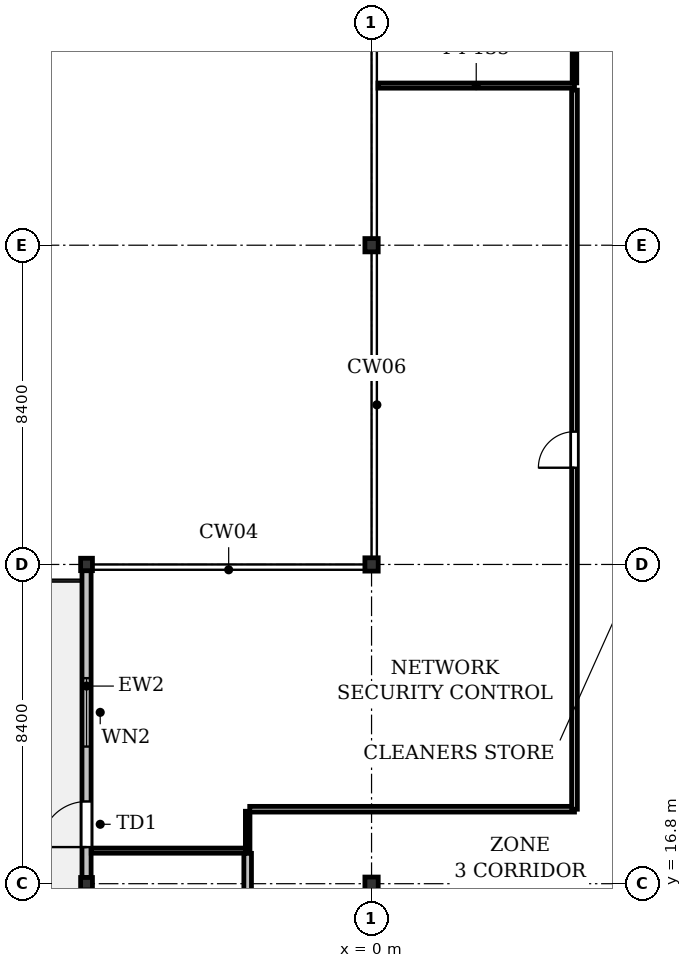
"""IFC4 building model, lengths in metres.
Left out: names, types, materials, properties, quantities, classifications, styles, units other than length and angle.
Written with IfcOpenShell. Run it as: python <this file> out.ifc"""

import sys

from ifc_helpers import new_model, si_unit, direction, frame, frame_2d, origin, origin_2d, place, context, subcontext, project, spatial, rectangle, i_section, extrude, element, fill, save


model = new_model("IFC4")
c1 = context("Model", 3, precision=1e-05, world=origin(), true_north=direction((0.0, 1.0)))
c2 = subcontext(c1, "Body", "Model", "MODEL_VIEW")
j1 = project(units=[si_unit("LENGTHUNIT", "METRE"), si_unit("PLANEANGLEUNIT", "RADIAN")], contexts=[c1])
p1 = place(None, origin())
s1 = spatial("IfcSite", under=j1, at=p1, CompositionType="ELEMENT")
p2 = place(p1, origin())
s2 = spatial("IfcBuilding", under=s1, at=p2, CompositionType="ELEMENT")
p3 = place(p2, frame((0.0, 0.0, 196.0)))
s3 = spatial("IfcBuildingStorey", under=s2, at=p3, CompositionType="ELEMENT", Elevation=196.0)
for number, where, z_axis, x_axis in (
    (1, (0.0, 16.8, 0.0), (0.0, 0.0, 1.0), (1.0, 0.0, 0.0)),
    (2, (0.0, 25.2, 0.0), (0.0, 0.0, 1.0), (1.0, 0.0, 0.0)),
    (3, (0.0, 33.6, 0.0), (0.0, 0.0, 1.0), (1.0, 0.0, 0.0)),
):
    element("IfcColumn", number, at=place(p3, frame(where, z_axis=z_axis, x_axis=x_axis)), inside=s3, PredefinedType="COLUMN", context=c2, shape_type="SweptSolid", body=[
        extrude(i_section(OverallWidth=0.35, OverallDepth=0.35, WebThickness=0.02, FlangeThickness=0.032, at=origin_2d()), origin(), (0.0, 0.0, 1.0), 4.1),
    ])
for number, where, z_axis, x_axis in (
    (4, (-7.5, 16.8, 0.0), (0.0, 0.0, 1.0), (1.0, 0.0, 0.0)),
    (5, (-7.5, 25.2, 0.0), (0.0, 0.0, 1.0), (1.0, 0.0, 0.0)),
):
    element("IfcColumn", number, at=place(p3, frame(where, z_axis=z_axis, x_axis=x_axis)), inside=s3, PredefinedType="COLUMN", context=c2, shape_type="SweptSolid", body=[
        extrude(i_section(OverallWidth=0.311, OverallDepth=0.327, WebThickness=0.016, FlangeThickness=0.025, FilletRadius=0.017, at=origin_2d()), origin(), (0.0, 0.0, 1.0), 4.1),
    ])
p4 = place(p3, frame((-7.5, 16.963, 0.0), z_axis=(0.0, 0.0, 1.0), x_axis=(0.0, 1.0, 0.0)))
e6 = element("IfcWall", 6, at=p4, inside=s3, PredefinedType="STANDARD", context=c2, shape_type="SweptSolid", body=[
    extrude(rectangle(XDim=8.073, YDim=0.24, at=frame_2d((4.037, 0.0))), origin(), (0.0, 0.0, 1.0), 3.422),
])
p5 = place(p4, frame((0.8, 0.0, 0.0)))
e7 = element("IfcOpeningElement", 7, at=p5, cuts=e6, PredefinedType="OPENING", context=c2, shape_type="SweptSolid", body=[
    extrude(rectangle(XDim=1.2, YDim=2.2, at=frame_2d((0.6, 1.1))), frame((0.0, 0.13, 0.0), z_axis=(0.0, -1.0, 0.0), x_axis=(1.0, 0.0, 0.0)), (0.0, 0.0, 1.0), 0.26),
])
p6 = place(p4, frame((3.445, 0.0, 0.9)))
e8 = element("IfcOpeningElement", 8, at=p6, cuts=e6, PredefinedType="OPENING", context=c2, shape_type="SweptSolid", body=[
    extrude(rectangle(XDim=1.8, YDim=1.6, at=frame_2d((0.9, 0.8))), frame((0.0, 0.13, 0.0), z_axis=(0.0, -1.0, 0.0), x_axis=(1.0, 0.0, 0.0)), (0.0, 0.0, 1.0), 0.26),
])
p7 = place(p3, frame((0.169, 37.8, 0.0), z_axis=(0.0, 0.0, 1.0), x_axis=(1.0, 0.0, 0.0)))
e9 = element("IfcWall", 9, at=p7, inside=s3, PredefinedType="PARTITIONING", context=c2, shape_type="SweptSolid", body=[
    extrude(rectangle(XDim=5.171, YDim=0.135, at=frame_2d((2.585, 0.0))), origin(), (0.0, 0.0, 1.0), 3.518),
])
p8 = place(p3, frame((5.34, 37.872, 0.0), z_axis=(0.0, 0.0, 1.0), x_axis=(0.0, 1.0, 0.0)))
e10 = element("IfcWall", 10, at=p8, inside=s3, PredefinedType="PARTITIONING", context=c2, shape_type="SweptSolid", body=[
    extrude(rectangle(XDim=2.907, YDim=0.12, at=frame_2d((1.454, 0.0))), origin(), (0.0, 0.0, 1.0), 3.825),
])
p9 = place(p8, frame((0.993, 0.0, 0.0)))
e11 = element("IfcOpeningElement", 11, at=p9, cuts=e10, PredefinedType="OPENING", context=c2, shape_type="SweptSolid", body=[
    extrude(rectangle(XDim=0.92, YDim=2.1, at=frame_2d((0.46, 1.05))), frame((0.0, 0.07, 0.0), z_axis=(0.0, -1.0, 0.0), x_axis=(1.0, 0.0, 0.0)), (0.0, 0.0, 1.0), 0.14),
])
p10 = place(p3, frame((-7.376, 17.67, 0.0), z_axis=(0.0, 0.0, 1.0), x_axis=(1.0, 0.0, 0.0)))
e12 = element("IfcWall", 12, at=p10, inside=s3, PredefinedType="PARTITIONING", context=c2, shape_type="SweptSolid", body=[
    extrude(rectangle(XDim=4.116, YDim=0.135, at=frame_2d((2.058, 0.0))), origin(), (0.0, 0.0, 1.0), 3.825),
])
p11 = place(p3, frame((-3.26, 17.67, 0.0), z_axis=(0.0, 0.0, 1.0), x_axis=(0.000235682294, 0.999999972227, 0.0)))
e13 = element("IfcWall", 13, at=p11, inside=s3, PredefinedType="PARTITIONING", context=c2, shape_type="SweptSolid", body=[
    extrude(rectangle(XDim=1.036, YDim=0.12, at=frame_2d((0.518, 0.0))), origin(), (0.0, 0.0, 1.0), 3.825),
])
p12 = place(p3, frame((-3.206, 18.76, 0.0), z_axis=(0.0, 0.0, 1.0), x_axis=(0.999999999592, 2.8568164e-05, 0.0)))
e14 = element("IfcWall", 14, at=p12, inside=s3, PredefinedType="PARTITIONING", context=c2, shape_type="SweptSolid", body=[
    extrude(rectangle(XDim=8.546, YDim=0.15, at=frame_2d((4.273, 0.0))), origin(), (0.0, 0.0, 1.0), 3.223),
])
p13 = place(p3, frame((5.34, 18.76, 0.0), z_axis=(0.0, 0.0, 1.0), x_axis=(0.0, 1.0, 0.0)))
e15 = element("IfcWall", 15, at=p13, inside=s3, PredefinedType="PARTITIONING", context=c2, shape_type="SweptSolid", body=[
    extrude(rectangle(XDim=18.92, YDim=0.15, at=frame_2d((9.46, 0.0))), origin(), (0.0, 0.0, 1.0), 3.213),
])
p14 = place(p13, frame((8.985, 0.0, 0.0)))
e16 = element("IfcOpeningElement", 16, at=p14, cuts=e15, PredefinedType="OPENING", context=c2, shape_type="SweptSolid", body=[
    extrude(rectangle(XDim=0.95, YDim=2.15, at=frame_2d((0.475, 1.075))), frame((0.0, 0.085, 0.0), z_axis=(0.0, -1.0, 0.0), x_axis=(1.0, 0.0, 0.0)), (0.0, 0.0, 1.0), 0.17),
])
p15 = place(p3, frame((-3.26, 16.4, 0.0), z_axis=(0.0, 0.0, 1.0), x_axis=(0.0, 1.0, 0.0)))
e17 = element("IfcWall", 17, at=p15, inside=s3, PredefinedType="PARTITIONING", context=c2, shape_type="SweptSolid", body=[
    extrude(rectangle(XDim=1.198, YDim=0.2, at=frame_2d((0.599, 0.0))), origin(), (0.0, 0.0, 1.0), 2.915),
])
p16 = place(p5, origin())
e18 = element("IfcDoor", 18, at=p16, inside=s3, OperationType="SINGLE_SWING_LEFT", PredefinedType="DOOR", context=c2, shape_type="SweptSolid", body=[
    extrude(rectangle(XDim=1.2, YDim=2.2, at=frame_2d((0.6, 1.1))), frame((0.0, 0.025, 0.0), z_axis=(0.0, -1.0, 0.0), x_axis=(1.0, 0.0, 0.0)), (0.0, 0.0, 1.0), 0.05),
])
fill(e7, e18)
p17 = place(p6, origin())
e19 = element("IfcWindow", 19, at=p17, inside=s3, PartitioningType="SINGLE_PANEL", PredefinedType="WINDOW", context=c2, shape_type="SweptSolid", body=[
    extrude(rectangle(XDim=1.8, YDim=1.6, at=frame_2d((0.9, 0.8))), frame((0.0, 0.03, 0.0), z_axis=(0.0, -1.0, 0.0), x_axis=(1.0, 0.0, 0.0)), (0.0, 0.0, 1.0), 0.06),
])
fill(e8, e19)
p18 = place(p14, origin())
e20 = element("IfcDoor", 20, at=p18, inside=s3, OperationType="SINGLE_SWING_LEFT", PredefinedType="DOOR", context=c2, shape_type="SweptSolid", body=[
    extrude(rectangle(XDim=0.95, YDim=2.15, at=frame_2d((0.475, 1.075))), frame((0.0, 0.025, 0.0), z_axis=(0.0, -1.0, 0.0), x_axis=(1.0, 0.0, 0.0)), (0.0, 0.0, 1.0), 0.05),
])
fill(e16, e20)
save(model, sys.argv[1])
